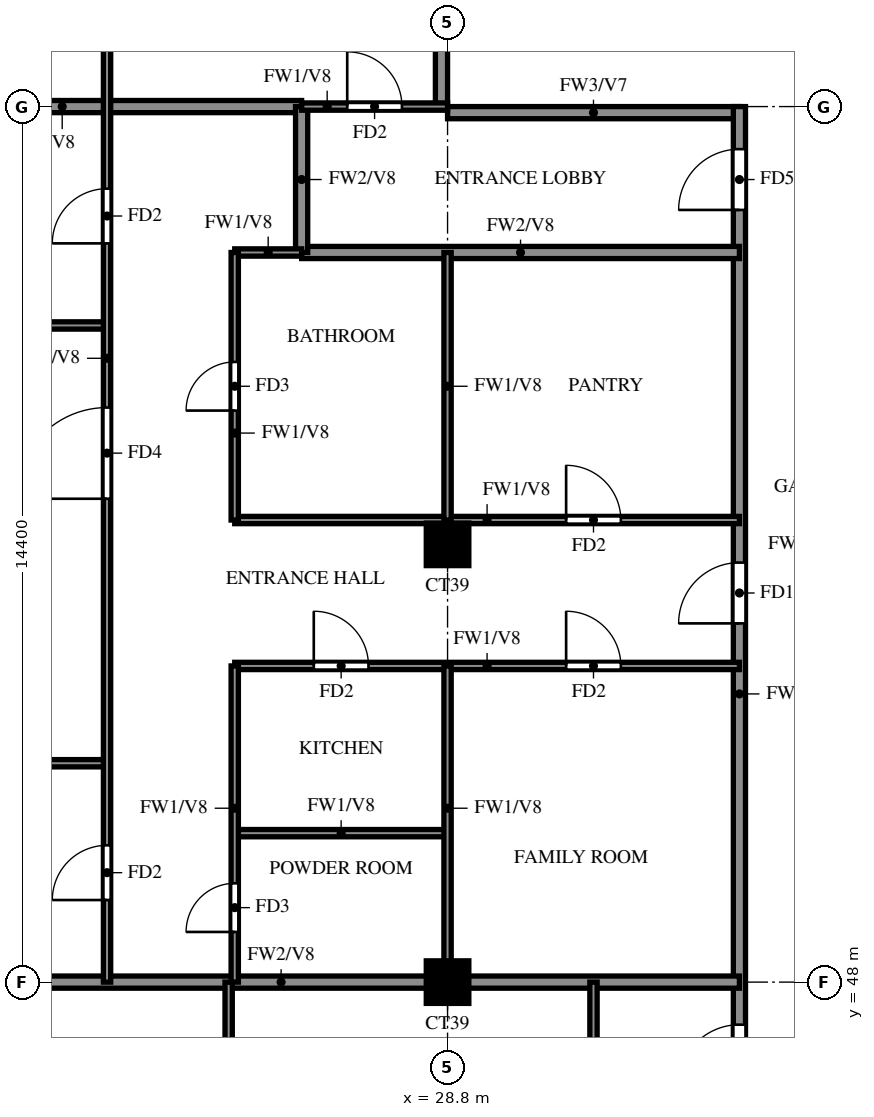
"""IFC4 building model, lengths in metres.
Left out: names, types, materials, properties, quantities, classifications, styles, units other than length and angle.
Written with IfcOpenShell. Run it as: python <this file> out.ifc"""

import sys

from ifc_helpers import new_model, si_unit, direction, frame, frame_2d, origin, origin_2d, place, context, subcontext, project, spatial, rectangle, extrude, source, transform, mapped, element, fill, save


model = new_model("IFC4")
c1 = context("Model", 3, precision=1e-05, world=origin(), true_north=direction((0.0, 1.0)))
c2 = subcontext(c1, "Body", "Model", "MODEL_VIEW")
j1 = project(units=[si_unit("LENGTHUNIT", "METRE"), si_unit("PLANEANGLEUNIT", "RADIAN")], contexts=[c1])
p1 = place(None, origin())
s1 = spatial("IfcSite", under=j1, at=p1, CompositionType="ELEMENT")
p2 = place(p1, origin())
s2 = spatial("IfcBuilding", under=s1, at=p2, CompositionType="ELEMENT")
p3 = place(p2, frame((0.0, 0.0, 267.5)))
s3 = spatial("IfcBuildingStorey", under=s2, at=p3, CompositionType="ELEMENT", Elevation=267.5)
m1 = source(origin(), c2, "Body", "SweptSolid", [
    extrude(rectangle(XDim=0.7, YDim=0.7, at=origin_2d()), origin(), (0.0, 0.0, 1.0), 3.099),
])
for number, where, z_axis, x_axis in (
    (1, (28.8, 48.0, 0.0), (0.0, 0.0, 1.0), (1.0, 0.0, 0.0)),
    (2, (28.8, 55.2, 0.0), (0.0, 0.0, 1.0), (1.0, 0.0, 0.0)),
):
    element("IfcColumn", number, at=place(p3, frame(where, z_axis=z_axis, x_axis=x_axis)), inside=s3, PredefinedType="COLUMN", context=c2, shape_type="MappedRepresentation", body=[
        mapped(m1, transform((0.0, 0.0, 0.0))),
    ])
p4 = place(p3, frame((28.8, 62.3, 0.0), z_axis=(0.0, 0.0, 1.0), x_axis=(1.0, 0.0, 0.0)))
e3 = element("IfcWall", 3, at=p4, inside=s3, PredefinedType="SOLIDWALL", context=c2, shape_type="SweptSolid", body=[
    extrude(rectangle(XDim=4.8, YDim=0.2, at=frame_2d((2.4, 0.0))), origin(), (0.0, 0.0, 1.0), 3.099),
])
p5 = place(p3, frame((28.7, 62.4, 0.0), z_axis=(0.0, 0.0, 1.0), x_axis=(0.0, 1.0, 0.0)))
e4 = element("IfcWall", 4, at=p5, inside=s3, PredefinedType="SOLIDWALL", context=c2, shape_type="SweptSolid", body=[
    extrude(rectangle(XDim=15.6, YDim=0.2, at=frame_2d((7.8, 0.0))), origin(), (0.0, 0.0, 1.0), 3.099),
])
p6 = place(p3, frame((33.6, 45.6, 0.0), z_axis=(0.0, 0.0, 1.0), x_axis=(0.0, 1.0, 0.0)))
e5 = element("IfcWall", 5, at=p6, inside=s3, PredefinedType="SOLIDWALL", context=c2, shape_type="SweptSolid", body=[
    extrude(rectangle(XDim=16.8, YDim=0.2, at=frame_2d((8.4, 0.0))), origin(), (0.0, 0.0, 1.0), 3.099),
])
p7 = place(p6, frame((0.7, 0.0, 0.0)))
e6 = element("IfcOpeningElement", 6, at=p7, cuts=e5, PredefinedType="OPENING", context=c2, shape_type="SweptSolid", body=[
    extrude(rectangle(XDim=1.0, YDim=2.1, at=frame_2d((0.5, 1.05))), frame((0.0, 0.11, 0.0), z_axis=(0.0, -1.0, 0.0), x_axis=(1.0, 0.0, 0.0)), (0.0, 0.0, 1.0), 0.22),
])
p8 = place(p6, frame((8.3, 0.0, 0.0)))
e7 = element("IfcOpeningElement", 7, at=p8, cuts=e5, PredefinedType="OPENING", context=c2, shape_type="SweptSolid", body=[
    extrude(rectangle(XDim=1.0, YDim=2.1, at=frame_2d((0.5, 1.05))), frame((0.0, 0.11, 0.0), z_axis=(0.0, -1.0, 0.0), x_axis=(1.0, 0.0, 0.0)), (0.0, 0.0, 1.0), 0.22),
])
p9 = place(p6, frame((15.1, 0.0, 0.0)))
e8 = element("IfcOpeningElement", 8, at=p9, cuts=e5, PredefinedType="OPENING", context=c2, shape_type="SweptSolid", body=[
    extrude(rectangle(XDim=1.0, YDim=2.1, at=frame_2d((0.5, 1.05))), frame((0.0, 0.11, 0.0), z_axis=(0.0, -1.0, 0.0), x_axis=(1.0, 0.0, 0.0)), (0.0, 0.0, 1.0), 0.22),
])
p10 = place(p3, frame((18.525, 48.0, 0.0), z_axis=(0.0, 0.0, 1.0), x_axis=(1.0, 0.0, 0.0)))
e9 = element("IfcWall", 9, at=p10, inside=s3, PredefinedType="SOLIDWALL", context=c2, shape_type="SweptSolid", body=[
    extrude(rectangle(XDim=15.075, YDim=0.2, at=frame_2d((7.538, 0.0))), origin(), (0.0, 0.0, 1.0), 3.099),
])
p11 = place(p3, frame((26.4, 60.0, 0.0), z_axis=(0.0, 0.0, 1.0), x_axis=(1.0, 0.0, 0.0)))
e10 = element("IfcWall", 10, at=p11, inside=s3, PredefinedType="SOLIDWALL", context=c2, shape_type="SweptSolid", body=[
    extrude(rectangle(XDim=7.2, YDim=0.2, at=frame_2d((3.6, 0.0))), origin(), (0.0, 0.0, 1.0), 3.099),
])
p12 = place(p3, frame((18.525, 62.4, 0.0), z_axis=(0.0, 0.0, 1.0), x_axis=(1.0, 0.0, 0.0)))
e11 = element("IfcWall", 11, at=p12, inside=s3, PredefinedType="SOLIDWALL", context=c2, shape_type="SweptSolid", body=[
    extrude(rectangle(XDim=7.875, YDim=0.2, at=frame_2d((3.938, 0.0))), origin(), (0.0, 0.0, 1.0), 3.099),
])
p13 = place(p3, frame((26.4, 60.0, 0.0), z_axis=(0.0, 0.0, 1.0), x_axis=(0.0, 1.0, 0.0)))
e12 = element("IfcWall", 12, at=p13, inside=s3, PredefinedType="SOLIDWALL", context=c2, shape_type="SweptSolid", body=[
    extrude(rectangle(XDim=2.4, YDim=0.2, at=frame_2d((1.2, 0.0))), origin(), (0.0, 0.0, 1.0), 3.099),
])
p14 = place(p3, frame((25.3, 50.45, 0.0), z_axis=(0.0, 0.0, 1.0), x_axis=(1.0, 0.0, 0.0)))
e13 = element("IfcWall", 13, at=p14, inside=s3, PredefinedType="PARTITIONING", context=c2, shape_type="SweptSolid", body=[
    extrude(rectangle(XDim=3.5, YDim=0.12, at=frame_2d((1.75, 0.0))), origin(), (0.0, 0.0, 1.0), 3.099),
])
p15 = place(p3, frame((18.525, 51.6, 0.0), z_axis=(0.0, 0.0, 1.0), x_axis=(1.0, 0.0, 0.0)))
e14 = element("IfcWall", 14, at=p15, inside=s3, PredefinedType="PARTITIONING", context=c2, shape_type="SweptSolid", body=[
    extrude(rectangle(XDim=4.675, YDim=0.12, at=frame_2d((2.337, 0.0))), origin(), (0.0, 0.0, 1.0), 3.099),
])
p16 = place(p3, frame((25.3, 53.2, 0.0), z_axis=(0.0, 0.0, 1.0), x_axis=(1.0, 0.0, 0.0)))
e15 = element("IfcWall", 15, at=p16, inside=s3, PredefinedType="PARTITIONING", context=c2, shape_type="SweptSolid", body=[
    extrude(rectangle(XDim=8.3, YDim=0.12, at=frame_2d((4.15, 0.0))), origin(), (0.0, 0.0, 1.0), 3.099),
])
p17 = place(p16, frame((1.3, 0.0, 0.0)))
e16 = element("IfcOpeningElement", 16, at=p17, cuts=e15, PredefinedType="OPENING", context=c2, shape_type="SweptSolid", body=[
    extrude(rectangle(XDim=0.9, YDim=2.1, at=frame_2d((0.45, 1.05))), frame((0.0, 0.07, 0.0), z_axis=(0.0, -1.0, 0.0), x_axis=(1.0, 0.0, 0.0)), (0.0, 0.0, 1.0), 0.14),
])
p18 = place(p16, frame((5.45, 0.0, 0.0)))
e17 = element("IfcOpeningElement", 17, at=p18, cuts=e15, PredefinedType="OPENING", context=c2, shape_type="SweptSolid", body=[
    extrude(rectangle(XDim=0.9, YDim=2.1, at=frame_2d((0.45, 1.05))), frame((0.0, 0.07, 0.0), z_axis=(0.0, -1.0, 0.0), x_axis=(1.0, 0.0, 0.0)), (0.0, 0.0, 1.0), 0.14),
])
p19 = place(p3, frame((25.3, 55.6, 0.0), z_axis=(0.0, 0.0, 1.0), x_axis=(1.0, 0.0, 0.0)))
e18 = element("IfcWall", 18, at=p19, inside=s3, PredefinedType="PARTITIONING", context=c2, shape_type="SweptSolid", body=[
    extrude(rectangle(XDim=8.3, YDim=0.12, at=frame_2d((4.15, 0.0))), origin(), (0.0, 0.0, 1.0), 3.099),
])
p20 = place(p19, frame((5.45, 0.0, 0.0)))
e19 = element("IfcOpeningElement", 19, at=p20, cuts=e18, PredefinedType="OPENING", context=c2, shape_type="SweptSolid", body=[
    extrude(rectangle(XDim=0.9, YDim=2.1, at=frame_2d((0.45, 1.05))), frame((0.0, 0.07, 0.0), z_axis=(0.0, -1.0, 0.0), x_axis=(1.0, 0.0, 0.0)), (0.0, 0.0, 1.0), 0.14),
])
p21 = place(p3, frame((18.525, 58.8, 0.0), z_axis=(0.0, 0.0, 1.0), x_axis=(1.0, 0.0, 0.0)))
e20 = element("IfcWall", 20, at=p21, inside=s3, PredefinedType="PARTITIONING", context=c2, shape_type="SweptSolid", body=[
    extrude(rectangle(XDim=4.675, YDim=0.12, at=frame_2d((2.337, 0.0))), origin(), (0.0, 0.0, 1.0), 3.099),
])
p22 = place(p3, frame((25.3, 60.0, 0.0), z_axis=(0.0, 0.0, 1.0), x_axis=(1.0, 0.0, 0.0)))
e21 = element("IfcWall", 21, at=p22, inside=s3, PredefinedType="PARTITIONING", context=c2, shape_type="SweptSolid", body=[
    extrude(rectangle(XDim=1.1, YDim=0.12, at=frame_2d((0.55, 0.0))), origin(), (0.0, 0.0, 1.0), 3.099),
])
p23 = place(p3, frame((26.4, 62.4, 0.0), z_axis=(0.0, 0.0, 1.0), x_axis=(1.0, 0.0, 0.0)))
e22 = element("IfcWall", 22, at=p23, inside=s3, PredefinedType="PARTITIONING", context=c2, shape_type="SweptSolid", body=[
    extrude(rectangle(XDim=2.4, YDim=0.12, at=frame_2d((1.2, 0.0))), origin(), (0.0, 0.0, 1.0), 3.099),
])
p24 = place(p23, frame((0.75, 0.0, 0.0)))
e23 = element("IfcOpeningElement", 23, at=p24, cuts=e22, PredefinedType="OPENING", context=c2, shape_type="SweptSolid", body=[
    extrude(rectangle(XDim=0.9, YDim=2.1, at=frame_2d((0.45, 1.05))), frame((0.0, 0.07, 0.0), z_axis=(0.0, -1.0, 0.0), x_axis=(1.0, 0.0, 0.0)), (0.0, 0.0, 1.0), 0.14),
])
p25 = place(p3, frame((23.2, 48.0, 0.0), z_axis=(0.0, 0.0, 1.0), x_axis=(0.0, 1.0, 0.0)))
e24 = element("IfcWall", 24, at=p25, inside=s3, PredefinedType="PARTITIONING", context=c2, shape_type="SweptSolid", body=[
    extrude(rectangle(XDim=21.6, YDim=0.12, at=frame_2d((10.8, 0.0))), origin(), (0.0, 0.0, 1.0), 3.099),
])
p26 = place(p25, frame((1.35, 0.0, 0.0)))
e25 = element("IfcOpeningElement", 25, at=p26, cuts=e24, PredefinedType="OPENING", context=c2, shape_type="SweptSolid", body=[
    extrude(rectangle(XDim=0.9, YDim=2.1, at=frame_2d((0.45, 1.05))), frame((0.0, 0.07, 0.0), z_axis=(0.0, -1.0, 0.0), x_axis=(1.0, 0.0, 0.0)), (0.0, 0.0, 1.0), 0.14),
])
p27 = place(p25, frame((7.95, 0.0, 0.0)))
e26 = element("IfcOpeningElement", 26, at=p27, cuts=e24, PredefinedType="OPENING", context=c2, shape_type="SweptSolid", body=[
    extrude(rectangle(XDim=1.5, YDim=2.1, at=frame_2d((0.75, 1.05))), frame((0.0, 0.07, 0.0), z_axis=(0.0, -1.0, 0.0), x_axis=(1.0, 0.0, 0.0)), (0.0, 0.0, 1.0), 0.14),
])
p28 = place(p25, frame((12.15, 0.0, 0.0)))
e27 = element("IfcOpeningElement", 27, at=p28, cuts=e24, PredefinedType="OPENING", context=c2, shape_type="SweptSolid", body=[
    extrude(rectangle(XDim=0.9, YDim=2.1, at=frame_2d((0.45, 1.05))), frame((0.0, 0.07, 0.0), z_axis=(0.0, -1.0, 0.0), x_axis=(1.0, 0.0, 0.0)), (0.0, 0.0, 1.0), 0.14),
])
p29 = place(p25, frame((15.75, 0.0, 0.0)))
e28 = element("IfcOpeningElement", 28, at=p29, cuts=e24, PredefinedType="OPENING", context=c2, shape_type="SweptSolid", body=[
    extrude(rectangle(XDim=0.9, YDim=2.1, at=frame_2d((0.45, 1.05))), frame((0.0, 0.07, 0.0), z_axis=(0.0, -1.0, 0.0), x_axis=(1.0, 0.0, 0.0)), (0.0, 0.0, 1.0), 0.14),
])
p30 = place(p25, frame((19.35, 0.0, 0.0)))
e29 = element("IfcOpeningElement", 29, at=p30, cuts=e24, PredefinedType="OPENING", context=c2, shape_type="SweptSolid", body=[
    extrude(rectangle(XDim=0.9, YDim=2.1, at=frame_2d((0.45, 1.05))), frame((0.0, 0.07, 0.0), z_axis=(0.0, -1.0, 0.0), x_axis=(1.0, 0.0, 0.0)), (0.0, 0.0, 1.0), 0.14),
])
p31 = place(p3, frame((25.2, 39.725, 0.0), z_axis=(0.0, 0.0, 1.0), x_axis=(0.0, 1.0, 0.0)))
e30 = element("IfcWall", 30, at=p31, inside=s3, PredefinedType="PARTITIONING", context=c2, shape_type="SweptSolid", body=[
    extrude(rectangle(XDim=8.275, YDim=0.12, at=frame_2d((4.137, 0.0))), origin(), (0.0, 0.0, 1.0), 3.099),
])
p32 = place(p31, frame((4.525, 0.0, 0.0)))
e31 = element("IfcOpeningElement", 31, at=p32, cuts=e30, PredefinedType="OPENING", context=c2, shape_type="SweptSolid", body=[
    extrude(rectangle(XDim=0.9, YDim=2.1, at=frame_2d((0.45, 1.05))), frame((0.0, 0.07, 0.0), z_axis=(0.0, -1.0, 0.0), x_axis=(1.0, 0.0, 0.0)), (0.0, 0.0, 1.0), 0.14),
])
p33 = place(p3, frame((25.3, 48.0, 0.0), z_axis=(0.0, 0.0, 1.0), x_axis=(0.0, 1.0, 0.0)))
e32 = element("IfcWall", 32, at=p33, inside=s3, PredefinedType="PARTITIONING", context=c2, shape_type="SweptSolid", body=[
    extrude(rectangle(XDim=5.2, YDim=0.12, at=frame_2d((2.6, 0.0))), origin(), (0.0, 0.0, 1.0), 3.099),
])
p34 = place(p33, frame((0.825, 0.0, 0.0)))
e33 = element("IfcOpeningElement", 33, at=p34, cuts=e32, PredefinedType="OPENING", context=c2, shape_type="SweptSolid", body=[
    extrude(rectangle(XDim=0.8, YDim=2.1, at=frame_2d((0.4, 1.05))), frame((0.0, 0.07, 0.0), z_axis=(0.0, -1.0, 0.0), x_axis=(1.0, 0.0, 0.0)), (0.0, 0.0, 1.0), 0.14),
])
p35 = place(p3, frame((25.3, 55.6, 0.0), z_axis=(0.0, 0.0, 1.0), x_axis=(0.0, 1.0, 0.0)))
e34 = element("IfcWall", 34, at=p35, inside=s3, PredefinedType="PARTITIONING", context=c2, shape_type="SweptSolid", body=[
    extrude(rectangle(XDim=4.4, YDim=0.12, at=frame_2d((2.2, 0.0))), origin(), (0.0, 0.0, 1.0), 3.099),
])
p36 = place(p35, frame((1.8, 0.0, 0.0)))
e35 = element("IfcOpeningElement", 35, at=p36, cuts=e34, PredefinedType="OPENING", context=c2, shape_type="SweptSolid", body=[
    extrude(rectangle(XDim=0.8, YDim=2.1, at=frame_2d((0.4, 1.05))), frame((0.0, 0.07, 0.0), z_axis=(0.0, -1.0, 0.0), x_axis=(1.0, 0.0, 0.0)), (0.0, 0.0, 1.0), 0.14),
])
p37 = place(p3, frame((28.8, 48.0, 0.0), z_axis=(0.0, 0.0, 1.0), x_axis=(0.0, 1.0, 0.0)))
e36 = element("IfcWall", 36, at=p37, inside=s3, PredefinedType="PARTITIONING", context=c2, shape_type="SweptSolid", body=[
    extrude(rectangle(XDim=5.2, YDim=0.12, at=frame_2d((2.6, 0.0))), origin(), (0.0, 0.0, 1.0), 3.099),
])
p38 = place(p3, frame((28.8, 55.6, 0.0), z_axis=(0.0, 0.0, 1.0), x_axis=(0.0, 1.0, 0.0)))
e37 = element("IfcWall", 37, at=p38, inside=s3, PredefinedType="PARTITIONING", context=c2, shape_type="SweptSolid", body=[
    extrude(rectangle(XDim=4.4, YDim=0.12, at=frame_2d((2.2, 0.0))), origin(), (0.0, 0.0, 1.0), 3.099),
])
p39 = place(p3, frame((31.2, 45.6, 0.0), z_axis=(0.0, 0.0, 1.0), x_axis=(0.0, 1.0, 0.0)))
e38 = element("IfcWall", 38, at=p39, inside=s3, PredefinedType="PARTITIONING", context=c2, shape_type="SweptSolid", body=[
    extrude(rectangle(XDim=2.4, YDim=0.12, at=frame_2d((1.2, 0.0))), origin(), (0.0, 0.0, 1.0), 3.099),
])
p40 = place(p7, origin())
e39 = element("IfcDoor", 39, at=p40, inside=s3, OperationType="SINGLE_SWING_RIGHT", PredefinedType="DOOR", context=c2, shape_type="SweptSolid", body=[
    extrude(rectangle(XDim=1.0, YDim=2.1, at=frame_2d((0.5, 1.05))), frame((0.0, 0.025, 0.0), z_axis=(0.0, -1.0, 0.0), x_axis=(1.0, 0.0, 0.0)), (0.0, 0.0, 1.0), 0.05),
])
fill(e6, e39)
p41 = place(p8, origin())
e40 = element("IfcDoor", 40, at=p41, inside=s3, OperationType="SINGLE_SWING_RIGHT", PredefinedType="DOOR", context=c2, shape_type="SweptSolid", body=[
    extrude(rectangle(XDim=1.0, YDim=2.1, at=frame_2d((0.5, 1.05))), frame((0.0, 0.025, 0.0), z_axis=(0.0, -1.0, 0.0), x_axis=(1.0, 0.0, 0.0)), (0.0, 0.0, 1.0), 0.05),
])
fill(e7, e40)
p42 = place(p26, origin())
e41 = element("IfcDoor", 41, at=p42, inside=s3, OperationType="SINGLE_SWING_LEFT", PredefinedType="DOOR", context=c2, shape_type="SweptSolid", body=[
    extrude(rectangle(XDim=0.9, YDim=2.1, at=frame_2d((0.45, 1.05))), frame((0.0, 0.025, 0.0), z_axis=(0.0, -1.0, 0.0), x_axis=(1.0, 0.0, 0.0)), (0.0, 0.0, 1.0), 0.05),
])
fill(e25, e41)
p43 = place(p27, origin())
e42 = element("IfcDoor", 42, at=p43, inside=s3, OperationType="SINGLE_SWING_RIGHT", PredefinedType="DOOR", context=c2, shape_type="SweptSolid", body=[
    extrude(rectangle(XDim=1.5, YDim=2.1, at=frame_2d((0.75, 1.05))), frame((0.0, 0.025, 0.0), z_axis=(0.0, -1.0, 0.0), x_axis=(1.0, 0.0, 0.0)), (0.0, 0.0, 1.0), 0.05),
])
fill(e26, e42)
p44 = place(p28, origin())
e43 = element("IfcDoor", 43, at=p44, inside=s3, OperationType="SINGLE_SWING_RIGHT", PredefinedType="DOOR", context=c2, shape_type="SweptSolid", body=[
    extrude(rectangle(XDim=0.9, YDim=2.1, at=frame_2d((0.45, 1.05))), frame((0.0, 0.025, 0.0), z_axis=(0.0, -1.0, 0.0), x_axis=(1.0, 0.0, 0.0)), (0.0, 0.0, 1.0), 0.05),
])
fill(e27, e43)
p45 = place(p34, origin())
e44 = element("IfcDoor", 44, at=p45, inside=s3, OperationType="SINGLE_SWING_LEFT", PredefinedType="DOOR", context=c2, shape_type="SweptSolid", body=[
    extrude(rectangle(XDim=0.8, YDim=2.1, at=frame_2d((0.4, 1.05))), frame((0.0, 0.025, 0.0), z_axis=(0.0, -1.0, 0.0), x_axis=(1.0, 0.0, 0.0)), (0.0, 0.0, 1.0), 0.05),
])
fill(e33, e44)
p46 = place(p17, origin())
e45 = element("IfcDoor", 45, at=p46, inside=s3, OperationType="SINGLE_SWING_LEFT", PredefinedType="DOOR", context=c2, shape_type="SweptSolid", body=[
    extrude(rectangle(XDim=0.9, YDim=2.1, at=frame_2d((0.45, 1.05))), frame((0.0, 0.025, 0.0), z_axis=(0.0, -1.0, 0.0), x_axis=(1.0, 0.0, 0.0)), (0.0, 0.0, 1.0), 0.05),
])
fill(e16, e45)
p47 = place(p36, origin())
e46 = element("IfcDoor", 46, at=p47, inside=s3, OperationType="SINGLE_SWING_RIGHT", PredefinedType="DOOR", context=c2, shape_type="SweptSolid", body=[
    extrude(rectangle(XDim=0.8, YDim=2.1, at=frame_2d((0.4, 1.05))), frame((0.0, 0.025, 0.0), z_axis=(0.0, -1.0, 0.0), x_axis=(1.0, 0.0, 0.0)), (0.0, 0.0, 1.0), 0.05),
])
fill(e35, e46)
p48 = place(p18, origin())
e47 = element("IfcDoor", 47, at=p48, inside=s3, OperationType="SINGLE_SWING_LEFT", PredefinedType="DOOR", context=c2, shape_type="SweptSolid", body=[
    extrude(rectangle(XDim=0.9, YDim=2.1, at=frame_2d((0.45, 1.05))), frame((0.0, 0.025, 0.0), z_axis=(0.0, -1.0, 0.0), x_axis=(1.0, 0.0, 0.0)), (0.0, 0.0, 1.0), 0.05),
])
fill(e17, e47)
p49 = place(p20, origin())
e48 = element("IfcDoor", 48, at=p49, inside=s3, OperationType="SINGLE_SWING_LEFT", PredefinedType="DOOR", context=c2, shape_type="SweptSolid", body=[
    extrude(rectangle(XDim=0.9, YDim=2.1, at=frame_2d((0.45, 1.05))), frame((0.0, 0.025, 0.0), z_axis=(0.0, -1.0, 0.0), x_axis=(1.0, 0.0, 0.0)), (0.0, 0.0, 1.0), 0.05),
])
fill(e19, e48)
p50 = place(p24, origin())
e49 = element("IfcDoor", 49, at=p50, inside=s3, OperationType="SINGLE_SWING_RIGHT", PredefinedType="DOOR", context=c2, shape_type="SweptSolid", body=[
    extrude(rectangle(XDim=0.9, YDim=2.1, at=frame_2d((0.45, 1.05))), frame((0.0, 0.025, 0.0), z_axis=(0.0, -1.0, 0.0), x_axis=(1.0, 0.0, 0.0)), (0.0, 0.0, 1.0), 0.05),
])
fill(e23, e49)
p51 = place(p9, origin())
e50 = element("IfcDoor", 50, at=p51, inside=s3, OperationType="SINGLE_SWING_LEFT", PredefinedType="DOOR", context=c2, shape_type="SweptSolid", body=[
    extrude(rectangle(XDim=1.0, YDim=2.1, at=frame_2d((0.5, 1.05))), frame((0.0, 0.025, 0.0), z_axis=(0.0, -1.0, 0.0), x_axis=(1.0, 0.0, 0.0)), (0.0, 0.0, 1.0), 0.05),
])
fill(e8, e50)
save(model, sys.argv[1])
